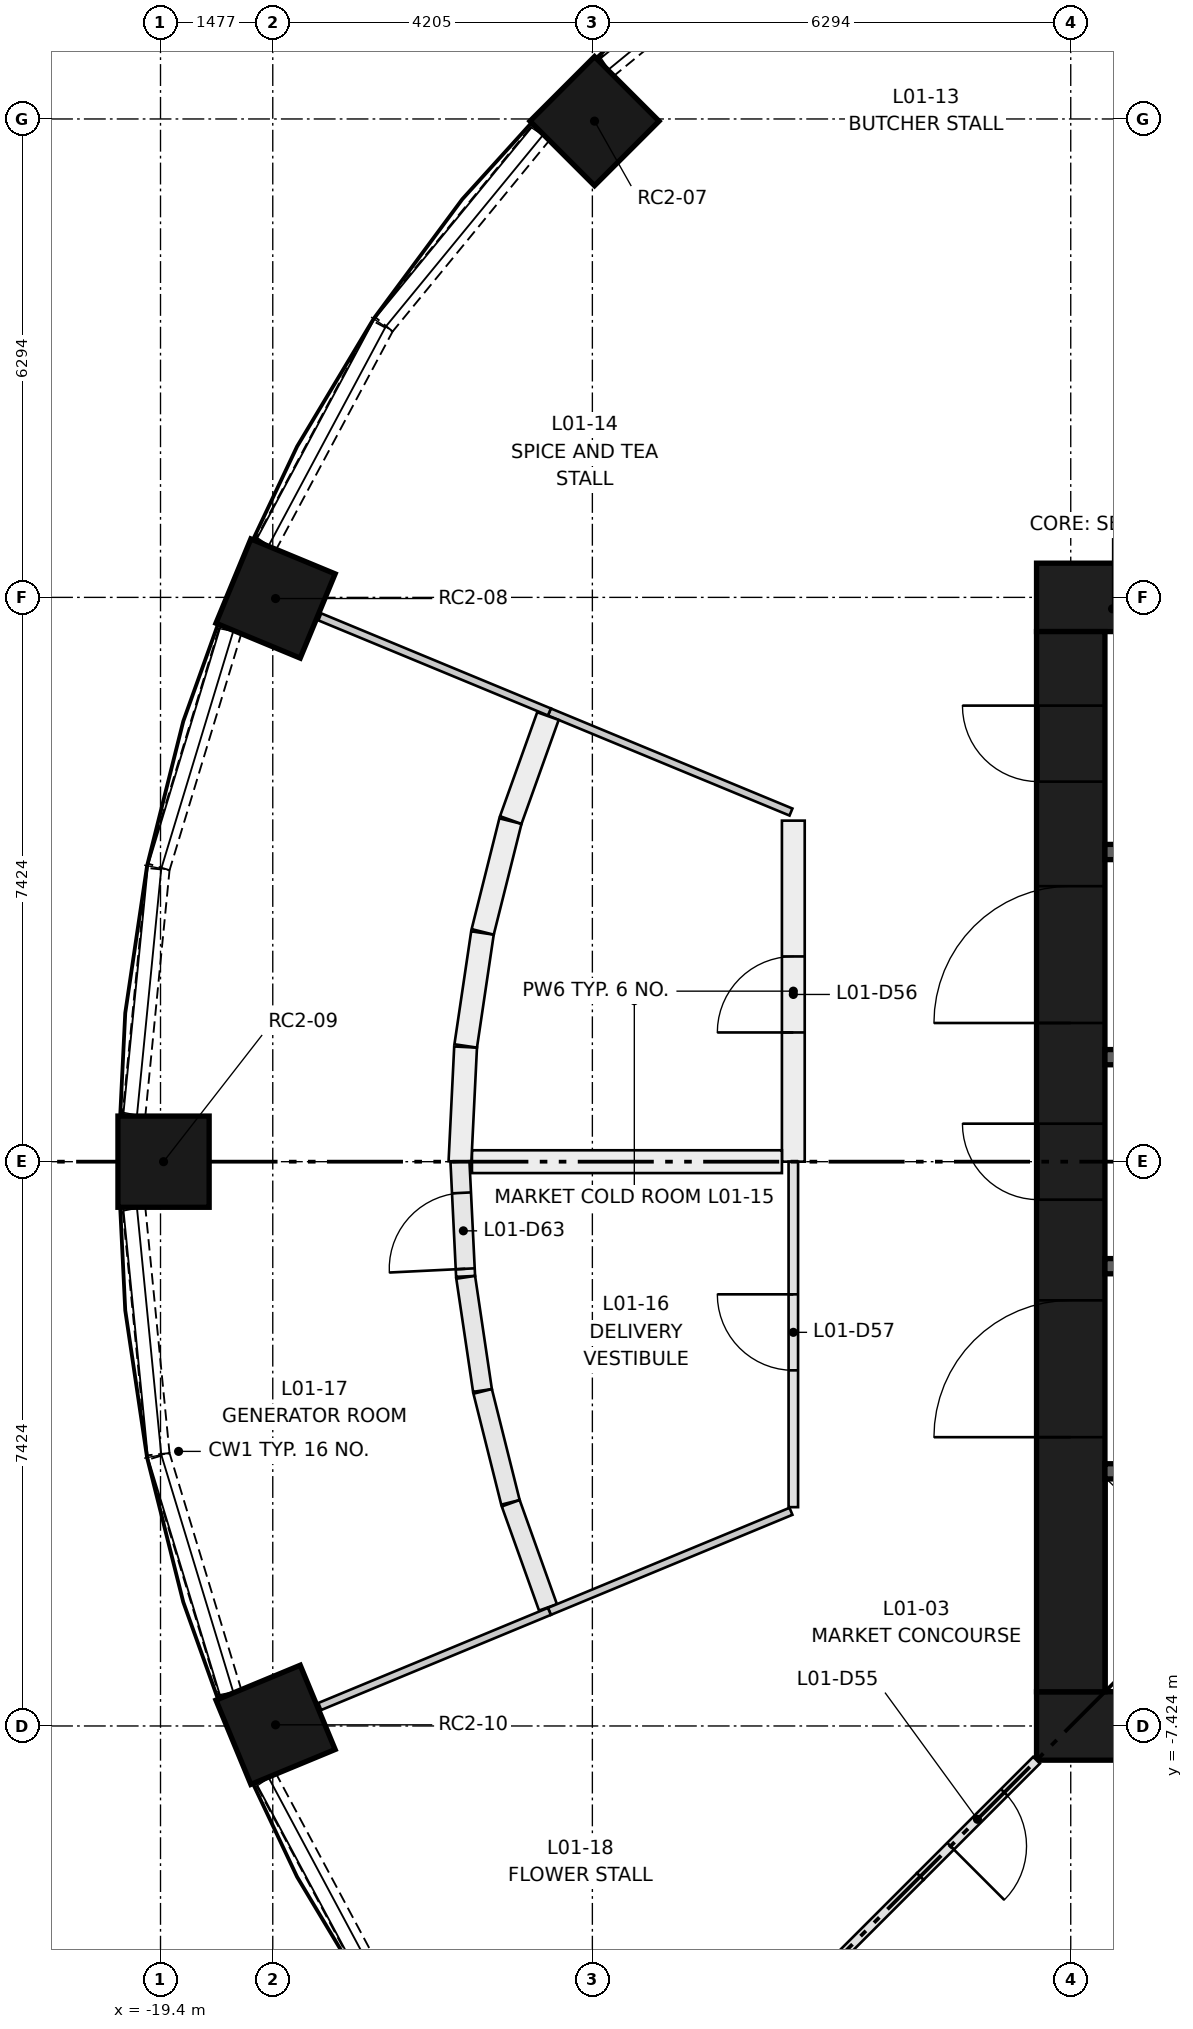
"""IFC4 building model, lengths in metres.
Left out: names, types, materials, properties, quantities, classifications, styles, units other than length and angle.
Written with IfcOpenShell. Run it as: python <this file> out.ifc"""

import sys

from ifc_helpers import new_model, si_unit, direction, frame, frame_2d, origin, origin_2d, place, context, subcontext, project, spatial, rectangle, extrude, element, fill, save


model = new_model("IFC4")
c1 = context("Model", 3, precision=1e-05, world=origin(), true_north=direction((0.0, 1.0)))
c2 = subcontext(c1, "Body", "Model", "MODEL_VIEW")
j1 = project(units=[si_unit("LENGTHUNIT", "METRE"), si_unit("PLANEANGLEUNIT", "RADIAN")], contexts=[c1])
p1 = place(None, origin())
s1 = spatial("IfcSite", under=j1, at=p1, CompositionType="ELEMENT")
p2 = place(p1, origin())
s2 = spatial("IfcBuilding", under=s1, at=p2, CompositionType="ELEMENT")
p3 = place(p2, frame((0.0, 0.0, 5.2)))
s3 = spatial("IfcBuildingStorey", under=s2, at=p3, CompositionType="ELEMENT", Elevation=5.2)
for number, where, z_axis, x_axis in (
    (1, (-13.69, 13.69, 0.0), (0.0, 0.0, 1.0), (-0.707, 0.707, 0.0)),
    (2, (-17.886, 7.409, 0.0), (0.0, 0.0, 1.0), (-0.924, 0.383, 0.0)),
    (3, (-19.36, 0.0, 0.0), (0.0, 0.0, 1.0), (-1.0, 0.0, 0.0)),
    (4, (-17.886, -7.409, 0.0), (0.0, 0.0, 1.0), (-0.924, -0.383, 0.0)),
):
    element("IfcColumn", number, at=place(p3, frame(where, z_axis=z_axis, x_axis=x_axis)), inside=s3, PredefinedType="COLUMN", context=c2, shape_type="SweptSolid", body=[
        extrude(rectangle(XDim=1.2, YDim=1.2, at=origin_2d()), origin(), (0.0, 0.0, 1.0), 4.7),
    ])
for number, where, z_axis, x_axis in (
    (5, (-7.874, -7.424, 0.0), (0.0, 0.0, 1.0), (1.0, 0.0, 0.0)),
    (6, (-7.874, 7.424, 0.0), (0.0, 0.0, 1.0), (1.0, 0.0, 0.0)),
):
    element("IfcWall", number, at=place(p3, frame(where, z_axis=z_axis, x_axis=x_axis)), inside=s3, PredefinedType="SHEAR", context=c2, shape_type="SweptSolid", body=[
        extrude(rectangle(XDim=15.748, YDim=0.9, at=frame_2d((7.874, 0.0))), origin(), (0.0, 0.0, 1.0), 4.7),
    ])
p4 = place(p3, frame((-7.424, -6.974, 0.0), z_axis=(0.0, 0.0, 1.0), x_axis=(0.0, 1.0, 0.0)))
e7 = element("IfcWall", 7, at=p4, inside=s3, PredefinedType="SHEAR", context=c2, shape_type="SweptSolid", body=[
    extrude(rectangle(XDim=13.948, YDim=0.9, at=frame_2d((6.974, 0.0))), origin(), (0.0, 0.0, 1.0), 4.7),
])
p5 = place(p4, frame((6.474, 0.0, 0.0)))
e8 = element("IfcOpeningElement", 8, at=p5, cuts=e7, PredefinedType="OPENING", context=c2, shape_type="SweptSolid", body=[
    extrude(rectangle(XDim=1.0, YDim=2.1, at=frame_2d((0.5, 1.05))), frame((0.0, 0.46, 0.0), z_axis=(0.0, -1.0, 0.0), x_axis=(1.0, 0.0, 0.0)), (0.0, 0.0, 1.0), 0.92),
])
p6 = place(p4, frame((3.35, 0.0, 0.0)))
e9 = element("IfcOpeningElement", 9, at=p6, cuts=e7, PredefinedType="OPENING", context=c2, shape_type="SweptSolid", body=[
    extrude(rectangle(XDim=1.8, YDim=2.1, at=frame_2d((0.9, 1.05))), frame((0.0, 0.46, 0.0), z_axis=(0.0, -1.0, 0.0), x_axis=(1.0, 0.0, 0.0)), (0.0, 0.0, 1.0), 0.92),
])
p7 = place(p4, frame((8.799, 0.0, 0.0)))
e10 = element("IfcOpeningElement", 10, at=p7, cuts=e7, PredefinedType="OPENING", context=c2, shape_type="SweptSolid", body=[
    extrude(rectangle(XDim=1.8, YDim=2.1, at=frame_2d((0.9, 1.05))), frame((0.0, 0.46, 0.0), z_axis=(0.0, -1.0, 0.0), x_axis=(1.0, 0.0, 0.0)), (0.0, 0.0, 1.0), 0.92),
])
p8 = place(p4, frame((11.974, 0.0, 0.0)))
e11 = element("IfcOpeningElement", 11, at=p8, cuts=e7, PredefinedType="OPENING", context=c2, shape_type="SweptSolid", body=[
    extrude(rectangle(XDim=1.0, YDim=2.1, at=frame_2d((0.5, 1.05))), frame((0.0, 0.46, 0.0), z_axis=(0.0, -1.0, 0.0), x_axis=(1.0, 0.0, 0.0)), (0.0, 0.0, 1.0), 0.92),
])
p9 = place(p3, frame((-6.974, -4.074, 0.0), z_axis=(0.0, 0.0, 1.0), x_axis=(1.0, 0.0, 0.0)))
e12 = element("IfcWall", 12, at=p9, inside=s3, PredefinedType="SHEAR", context=c2, shape_type="SweptSolid", body=[
    extrude(rectangle(XDim=13.948, YDim=0.2, at=frame_2d((6.974, 0.0))), origin(), (0.0, 0.0, 1.0), 4.3),
])
p10 = place(p9, frame((0.918, 0.0, 0.0)))
e13 = element("IfcOpeningElement", 13, at=p10, cuts=e12, PredefinedType="OPENING", context=c2, shape_type="SweptSolid", body=[
    extrude(rectangle(XDim=1.1, YDim=2.1, at=frame_2d((0.55, 1.05))), frame((0.0, 0.11, 0.0), z_axis=(0.0, -1.0, 0.0), x_axis=(1.0, 0.0, 0.0)), (0.0, 0.0, 1.0), 0.22),
])
p11 = place(p9, frame((4.055, 0.0, 0.0)))
e14 = element("IfcOpeningElement", 14, at=p11, cuts=e12, PredefinedType="OPENING", context=c2, shape_type="SweptSolid", body=[
    extrude(rectangle(XDim=1.1, YDim=2.1, at=frame_2d((0.55, 1.05))), frame((0.0, 0.11, 0.0), z_axis=(0.0, -1.0, 0.0), x_axis=(1.0, 0.0, 0.0)), (0.0, 0.0, 1.0), 0.22),
])
p12 = place(p9, frame((6.658, 0.0, 0.0)))
e15 = element("IfcOpeningElement", 15, at=p12, cuts=e12, PredefinedType="OPENING", context=c2, shape_type="SweptSolid", body=[
    extrude(rectangle(XDim=1.0, YDim=2.1, at=frame_2d((0.5, 1.05))), frame((0.0, 0.11, 0.0), z_axis=(0.0, -1.0, 0.0), x_axis=(1.0, 0.0, 0.0)), (0.0, 0.0, 1.0), 0.22),
])
p13 = place(p9, frame((8.627, 0.0, 0.0)))
e16 = element("IfcOpeningElement", 16, at=p13, cuts=e12, PredefinedType="OPENING", context=c2, shape_type="SweptSolid", body=[
    extrude(rectangle(XDim=1.0, YDim=2.1, at=frame_2d((0.5, 1.05))), frame((0.0, 0.11, 0.0), z_axis=(0.0, -1.0, 0.0), x_axis=(1.0, 0.0, 0.0)), (0.0, 0.0, 1.0), 0.22),
])
p14 = place(p9, frame((10.595, 0.0, 0.0)))
e17 = element("IfcOpeningElement", 17, at=p14, cuts=e12, PredefinedType="OPENING", context=c2, shape_type="SweptSolid", body=[
    extrude(rectangle(XDim=1.0, YDim=2.1, at=frame_2d((0.5, 1.05))), frame((0.0, 0.11, 0.0), z_axis=(0.0, -1.0, 0.0), x_axis=(1.0, 0.0, 0.0)), (0.0, 0.0, 1.0), 0.22),
])
p15 = place(p9, frame((12.564, 0.0, 0.0)))
e18 = element("IfcOpeningElement", 18, at=p15, cuts=e12, PredefinedType="OPENING", context=c2, shape_type="SweptSolid", body=[
    extrude(rectangle(XDim=1.0, YDim=2.1, at=frame_2d((0.5, 1.05))), frame((0.0, 0.11, 0.0), z_axis=(0.0, -1.0, 0.0), x_axis=(1.0, 0.0, 0.0)), (0.0, 0.0, 1.0), 0.22),
])
p16 = place(p3, frame((-6.974, 4.074, 0.0), z_axis=(0.0, 0.0, 1.0), x_axis=(1.0, 0.0, 0.0)))
e19 = element("IfcWall", 19, at=p16, inside=s3, PredefinedType="SHEAR", context=c2, shape_type="SweptSolid", body=[
    extrude(rectangle(XDim=6.974, YDim=0.2, at=frame_2d((3.487, 0.0))), origin(), (0.0, 0.0, 1.0), 4.3),
])
for number, where, z_axis, x_axis in (
    (20, (-6.974, -1.375, 0.0), (0.0, 0.0, 1.0), (1.0, 0.0, 0.0)),
    (21, (-6.974, 1.375, 0.0), (0.0, 0.0, 1.0), (1.0, 0.0, 0.0)),
):
    element("IfcWall", number, at=place(p3, frame(where, z_axis=z_axis, x_axis=x_axis)), inside=s3, PredefinedType="SHEAR", context=c2, shape_type="SweptSolid", body=[
        extrude(rectangle(XDim=2.6, YDim=0.2, at=frame_2d((1.3, 0.0))), origin(), (0.0, 0.0, 1.0), 4.3),
    ])
for number, where, z_axis, x_axis in (
    (22, (-11.018, 16.461, 0.0), (0.0, 0.0, 1.0), (-0.773, -0.634, 0.0)),
    (23, (-14.399, 13.531, 0.0), (0.0, 0.0, 1.0), (-0.634, -0.773, 0.0)),
):
    element("IfcWall", number, at=place(p3, frame(where, z_axis=z_axis, x_axis=x_axis)), inside=s3, PredefinedType="SOLIDWALL", context=c2, shape_type="SweptSolid", body=[
        extrude(rectangle(XDim=3.251, YDim=0.3, at=frame_2d((1.626, 0.0))), origin(), (0.0, 0.0, 1.0), 0.45),
    ])
p17 = place(p3, frame((-16.478, 10.993, 0.0), z_axis=(0.0, 0.0, 1.0), x_axis=(-0.471308820961, -0.881968250723, 0.0)))
e24 = element("IfcWall", 24, at=p17, inside=s3, PredefinedType="SOLIDWALL", context=c2, shape_type="SweptSolid", body=[
    extrude(rectangle(XDim=3.252, YDim=0.3, at=frame_2d((1.626, 0.0))), origin(), (0.0, 0.0, 1.0), 0.45),
])
p18 = place(p3, frame((-18.48, 6.99, 0.0), z_axis=(0.0, 0.0, 1.0), x_axis=(-0.290301164038, -0.956935334366, 0.0)))
e25 = element("IfcWall", 25, at=p18, inside=s3, PredefinedType="SOLIDWALL", context=c2, shape_type="SweptSolid", body=[
    extrude(rectangle(XDim=3.252, YDim=0.3, at=frame_2d((1.626, 0.0))), origin(), (0.0, 0.0, 1.0), 0.45),
])
for number, where, z_axis, x_axis in (
    (26, (-19.43, 3.849, 0.0), (0.0, 0.0, 1.0), (-0.098, -0.995, 0.0)),
    (27, (-19.75, -0.613, 0.0), (0.0, 0.0, 1.0), (0.098, -0.995, 0.0)),
):
    element("IfcWall", number, at=place(p3, frame(where, z_axis=z_axis, x_axis=x_axis)), inside=s3, PredefinedType="SOLIDWALL", context=c2, shape_type="SweptSolid", body=[
        extrude(rectangle(XDim=3.252, YDim=0.3, at=frame_2d((1.626, 0.0))), origin(), (0.0, 0.0, 1.0), 0.45),
    ])
p19 = place(p3, frame((-19.425, -3.878, 0.0), z_axis=(0.0, 0.0, 1.0), x_axis=(0.290301164038, -0.956935334366, 0.0)))
e28 = element("IfcWall", 28, at=p19, inside=s3, PredefinedType="SOLIDWALL", context=c2, shape_type="SweptSolid", body=[
    extrude(rectangle(XDim=3.252, YDim=0.3, at=frame_2d((1.626, 0.0))), origin(), (0.0, 0.0, 1.0), 0.45),
])
p20 = place(p3, frame((-18.011, -8.124, 0.0), z_axis=(0.0, 0.0, 1.0), x_axis=(0.471308820961, -0.881968250723, 0.0)))
e29 = element("IfcWall", 29, at=p20, inside=s3, PredefinedType="SOLIDWALL", context=c2, shape_type="SweptSolid", body=[
    extrude(rectangle(XDim=3.252, YDim=0.3, at=frame_2d((1.626, 0.0))), origin(), (0.0, 0.0, 1.0), 0.45),
])
p21 = place(p3, frame((-7.874, -7.874, 0.0), z_axis=(0.0, 0.0, 1.0), x_axis=(-0.707106781187, -0.707106781187, 0.0)))
e30 = element("IfcWall", 30, at=p21, inside=s3, PredefinedType="PARTITIONING", context=c2, shape_type="SweptSolid", body=[
    extrude(rectangle(XDim=2.165, YDim=0.125, at=frame_2d((1.082, 0.0))), origin(), (0.0, 0.0, 1.0), 4.3),
])
p22 = place(p21, frame((0.6, 0.0, 0.0)))
e31 = element("IfcOpeningElement", 31, at=p22, cuts=e30, PredefinedType="OPENING", context=c2, shape_type="SweptSolid", body=[
    extrude(rectangle(XDim=1.0, YDim=2.1, at=frame_2d((0.5, 1.05))), frame((0.0, 0.073, 0.0), z_axis=(0.0, -1.0, 0.0), x_axis=(1.0, 0.0, 0.0)), (0.0, 0.0, 1.0), 0.145),
])
p23 = place(p3, frame((-11.074, 0.0, 0.0), z_axis=(0.0, 0.0, 1.0), x_axis=(0.0, 1.0, 0.0)))
e32 = element("IfcWall", 32, at=p23, inside=s3, PredefinedType="PARTITIONING", context=c2, shape_type="SweptSolid", body=[
    extrude(rectangle(XDim=4.487, YDim=0.3, at=frame_2d((2.243, 0.0))), origin(), (0.0, 0.0, 1.0), 4.3),
])
p24 = place(p23, frame((1.7, 0.0, 0.0)))
e33 = element("IfcOpeningElement", 33, at=p24, cuts=e32, PredefinedType="OPENING", context=c2, shape_type="SweptSolid", body=[
    extrude(rectangle(XDim=1.0, YDim=2.1, at=frame_2d((0.5, 1.05))), frame((0.0, 0.16, 0.0), z_axis=(0.0, -1.0, 0.0), x_axis=(1.0, 0.0, 0.0)), (0.0, 0.0, 1.0), 0.32),
])
p25 = place(p3, frame((-11.074, -4.545, 0.0), z_axis=(0.0, 0.0, 1.0), x_axis=(0.0, 1.0, 0.0)))
e34 = element("IfcWall", 34, at=p25, inside=s3, PredefinedType="PARTITIONING", context=c2, shape_type="SweptSolid", body=[
    extrude(rectangle(XDim=4.545, YDim=0.125, at=frame_2d((2.272, 0.0))), origin(), (0.0, 0.0, 1.0), 4.3),
])
p26 = place(p25, frame((1.8, 0.0, 0.0)))
e35 = element("IfcOpeningElement", 35, at=p26, cuts=e34, PredefinedType="OPENING", context=c2, shape_type="SweptSolid", body=[
    extrude(rectangle(XDim=1.0, YDim=2.1, at=frame_2d((0.5, 1.05))), frame((0.0, 0.073, 0.0), z_axis=(0.0, -1.0, 0.0), x_axis=(1.0, 0.0, 0.0)), (0.0, 0.0, 1.0), 0.145),
])
p27 = place(p3, frame((-5.916, 14.283, 0.0), z_axis=(0.0, 0.0, 1.0), x_axis=(-0.382716658507, 0.923865769093, 0.0)))
e36 = element("IfcWall", 36, at=p27, inside=s3, PredefinedType="PARTITIONING", context=c2, shape_type="SweptSolid", body=[
    extrude(rectangle(XDim=3.27, YDim=0.1, at=frame_2d((1.635, 0.0))), origin(), (0.0, 0.0, 1.0), 4.3),
])
p28 = place(p3, frame((-11.105, 4.6, 0.0), z_axis=(0.0, 0.0, 1.0), x_axis=(-0.92388535755, 0.382669369174, 0.0)))
e37 = element("IfcWall", 37, at=p28, inside=s3, PredefinedType="PARTITIONING", context=c2, shape_type="SweptSolid", body=[
    extrude(rectangle(XDim=3.44, YDim=0.1, at=frame_2d((1.72, 0.0))), origin(), (0.0, 0.0, 1.0), 4.3),
])
p29 = place(p3, frame((-14.283, 5.916, 0.0), z_axis=(0.0, 0.0, 1.0), x_axis=(-0.923865769093, 0.382716658507, 0.0)))
e38 = element("IfcWall", 38, at=p29, inside=s3, PredefinedType="PARTITIONING", context=c2, shape_type="SweptSolid", body=[
    extrude(rectangle(XDim=3.27, YDim=0.1, at=frame_2d((1.635, 0.0))), origin(), (0.0, 0.0, 1.0), 4.3),
])
p30 = place(p3, frame((-11.224, 0.0, 0.0), z_axis=(0.0, 0.0, 1.0), x_axis=(-1.0, 0.0, 0.0)))
e39 = element("IfcWall", 39, at=p30, inside=s3, PredefinedType="PARTITIONING", context=c2, shape_type="SweptSolid", body=[
    extrude(rectangle(XDim=4.078, YDim=0.3, at=frame_2d((2.039, 0.0))), origin(), (0.0, 0.0, 1.0), 4.3),
])
p31 = place(p3, frame((-15.46, 0.0, 0.0), z_axis=(0.0, 0.0, 1.0), x_axis=(0.049001943169, 0.998798683202, 0.0)))
e40 = element("IfcWall", 40, at=p31, inside=s3, PredefinedType="PARTITIONING", context=c2, shape_type="SweptSolid", body=[
    extrude(rectangle(XDim=1.51, YDim=0.3, at=frame_2d((0.755, 0.0))), origin(), (0.0, 0.0, 1.0), 4.3),
])
for number, where, z_axis, x_axis in (
    (41, (-15.385, 1.523, 0.0), (0.0, 0.0, 1.0), (0.147, 0.989, 0.0)),
    (42, (-15.161, 3.023, 0.0), (0.0, 0.0, 1.0), (0.243, 0.97, 0.0)),
):
    element("IfcWall", number, at=place(p3, frame(where, z_axis=z_axis, x_axis=x_axis)), inside=s3, PredefinedType="PARTITIONING", context=c2, shape_type="SweptSolid", body=[
        extrude(rectangle(XDim=1.502, YDim=0.3, at=frame_2d((0.751, 0.0))), origin(), (0.0, 0.0, 1.0), 4.3),
    ])
p32 = place(p3, frame((-14.792, 4.495, 0.0), z_axis=(0.0, 0.0, 1.0), x_axis=(0.336826132197, 0.941566862559, 0.0)))
e43 = element("IfcWall", 43, at=p32, inside=s3, PredefinedType="PARTITIONING", context=c2, shape_type="SweptSolid", body=[
    extrude(rectangle(XDim=1.453, YDim=0.3, at=frame_2d((0.726, 0.0))), origin(), (0.0, 0.0, 1.0), 4.3),
])
p33 = place(p3, frame((-15.386, -1.509, 0.0), z_axis=(0.0, 0.0, 1.0), x_axis=(-0.048954497891, 0.998801009779, 0.0)))
e44 = element("IfcWall", 44, at=p33, inside=s3, PredefinedType="PARTITIONING", context=c2, shape_type="SweptSolid", body=[
    extrude(rectangle(XDim=1.511, YDim=0.25, at=frame_2d((0.755, 0.0))), origin(), (0.0, 0.0, 1.0), 4.3),
])
p34 = place(p33, frame((0.1, 0.0, 0.0)))
e45 = element("IfcOpeningElement", 45, at=p34, cuts=e44, PredefinedType="OPENING", context=c2, shape_type="SweptSolid", body=[
    extrude(rectangle(XDim=1.0, YDim=2.1, at=frame_2d((0.5, 1.05))), frame((0.0, 0.135, 0.0), z_axis=(0.0, -1.0, 0.0), x_axis=(1.0, 0.0, 0.0)), (0.0, 0.0, 1.0), 0.27),
])
p35 = place(p3, frame((-15.164, -3.01, 0.0), z_axis=(0.0, 0.0, 1.0), x_axis=(-0.146825003666, 0.989162483265, 0.0)))
e46 = element("IfcWall", 46, at=p35, inside=s3, PredefinedType="PARTITIONING", context=c2, shape_type="SweptSolid", body=[
    extrude(rectangle(XDim=1.505, YDim=0.25, at=frame_2d((0.752, 0.0))), origin(), (0.0, 0.0, 1.0), 4.3),
])
p36 = place(p3, frame((-14.796, -4.482, 0.0), z_axis=(0.0, 0.0, 1.0), x_axis=(-0.242917416803, 0.970046972375, 0.0)))
e47 = element("IfcWall", 47, at=p36, inside=s3, PredefinedType="PARTITIONING", context=c2, shape_type="SweptSolid", body=[
    extrude(rectangle(XDim=1.505, YDim=0.25, at=frame_2d((0.752, 0.0))), origin(), (0.0, 0.0, 1.0), 4.3),
])
p37 = place(p3, frame((-14.302, -5.863, 0.0), z_axis=(0.0, 0.0, 1.0), x_axis=(-0.336995469999, 0.941506268274, 0.0)))
e48 = element("IfcWall", 48, at=p37, inside=s3, PredefinedType="PARTITIONING", context=c2, shape_type="SweptSolid", body=[
    extrude(rectangle(XDim=1.455, YDim=0.25, at=frame_2d((0.728, 0.0))), origin(), (0.0, 0.0, 1.0), 4.3),
])
p38 = place(p3, frame((-11.105, -4.6, 0.0), z_axis=(0.0, 0.0, 1.0), x_axis=(-0.92388535755, -0.382669369174, 0.0)))
e49 = element("IfcWall", 49, at=p38, inside=s3, PredefinedType="PARTITIONING", context=c2, shape_type="SweptSolid", body=[
    extrude(rectangle(XDim=3.44, YDim=0.1, at=frame_2d((1.72, 0.0))), origin(), (0.0, 0.0, 1.0), 4.3),
])
p39 = place(p3, frame((-14.283, -5.916, 0.0), z_axis=(0.0, 0.0, 1.0), x_axis=(-0.923865769093, -0.382716658507, 0.0)))
e50 = element("IfcWall", 50, at=p39, inside=s3, PredefinedType="PARTITIONING", context=c2, shape_type="SweptSolid", body=[
    extrude(rectangle(XDim=3.27, YDim=0.1, at=frame_2d((1.635, 0.0))), origin(), (0.0, 0.0, 1.0), 4.3),
])
p40 = place(p3, frame((-9.405, -9.405, 0.0), z_axis=(0.0, 0.0, 1.0), x_axis=(-0.707106781187, -0.707106781187, 0.0)))
e51 = element("IfcWall", 51, at=p40, inside=s3, PredefinedType="PARTITIONING", context=c2, shape_type="SweptSolid", body=[
    extrude(rectangle(XDim=5.43, YDim=0.125, at=frame_2d((2.715, 0.0))), origin(), (0.0, 0.0, 1.0), 4.3),
])
p41 = place(p5, origin())
e52 = element("IfcDoor", 52, at=p41, inside=s3, OperationType="SINGLE_SWING_RIGHT", PredefinedType="DOOR", context=c2, shape_type="SweptSolid", body=[
    extrude(rectangle(XDim=1.0, YDim=2.1, at=frame_2d((0.5, 1.05))), frame((0.0, 0.45, 0.0), z_axis=(0.0, -1.0, 0.0), x_axis=(1.0, 0.0, 0.0)), (0.0, 0.0, 1.0), 0.05),
])
fill(e8, e52)
p42 = place(p6, origin())
e53 = element("IfcDoor", 53, at=p42, inside=s3, OperationType="DOUBLE_DOOR_SINGLE_SWING", PredefinedType="DOOR", context=c2, shape_type="SweptSolid", body=[
    extrude(rectangle(XDim=1.8, YDim=2.1, at=frame_2d((0.9, 1.05))), frame((0.0, 0.025, 0.0), z_axis=(0.0, -1.0, 0.0), x_axis=(1.0, 0.0, 0.0)), (0.0, 0.0, 1.0), 0.05),
])
fill(e9, e53)
p43 = place(p7, origin())
e54 = element("IfcDoor", 54, at=p43, inside=s3, OperationType="DOUBLE_DOOR_SINGLE_SWING", PredefinedType="DOOR", context=c2, shape_type="SweptSolid", body=[
    extrude(rectangle(XDim=1.8, YDim=2.1, at=frame_2d((0.9, 1.05))), frame((0.0, 0.025, 0.0), z_axis=(0.0, -1.0, 0.0), x_axis=(1.0, 0.0, 0.0)), (0.0, 0.0, 1.0), 0.05),
])
fill(e10, e54)
p44 = place(p8, origin())
e55 = element("IfcDoor", 55, at=p44, inside=s3, OperationType="SINGLE_SWING_RIGHT", PredefinedType="DOOR", context=c2, shape_type="SweptSolid", body=[
    extrude(rectangle(XDim=1.0, YDim=2.1, at=frame_2d((0.5, 1.05))), frame((0.0, 0.45, 0.0), z_axis=(0.0, -1.0, 0.0), x_axis=(1.0, 0.0, 0.0)), (0.0, 0.0, 1.0), 0.05),
])
fill(e11, e55)
p45 = place(p22, origin())
e56 = element("IfcDoor", 56, at=p45, inside=s3, OperationType="SINGLE_SWING_RIGHT", PredefinedType="DOOR", context=c2, shape_type="SweptSolid", body=[
    extrude(rectangle(XDim=1.0, YDim=2.1, at=frame_2d((0.5, 1.05))), frame((0.0, 0.025, 0.0), z_axis=(0.0, -1.0, 0.0), x_axis=(1.0, 0.0, 0.0)), (0.0, 0.0, 1.0), 0.05),
])
fill(e31, e56)
p46 = place(p24, origin())
e57 = element("IfcDoor", 57, at=p46, inside=s3, OperationType="SINGLE_SWING_LEFT", PredefinedType="DOOR", context=c2, shape_type="SweptSolid", body=[
    extrude(rectangle(XDim=1.0, YDim=2.1, at=frame_2d((0.5, 1.05))), frame((0.0, 0.025, 0.0), z_axis=(0.0, -1.0, 0.0), x_axis=(1.0, 0.0, 0.0)), (0.0, 0.0, 1.0), 0.05),
])
fill(e33, e57)
p47 = place(p26, origin())
e58 = element("IfcDoor", 58, at=p47, inside=s3, OperationType="SINGLE_SWING_RIGHT", PredefinedType="DOOR", context=c2, shape_type="SweptSolid", body=[
    extrude(rectangle(XDim=1.0, YDim=2.1, at=frame_2d((0.5, 1.05))), frame((0.0, 0.025, 0.0), z_axis=(0.0, -1.0, 0.0), x_axis=(1.0, 0.0, 0.0)), (0.0, 0.0, 1.0), 0.05),
])
fill(e35, e58)
p48 = place(p34, origin())
e59 = element("IfcDoor", 59, at=p48, inside=s3, OperationType="SINGLE_SWING_LEFT", PredefinedType="DOOR", context=c2, shape_type="SweptSolid", body=[
    extrude(rectangle(XDim=1.0, YDim=2.1, at=frame_2d((0.5, 1.05))), frame((0.0, 0.025, 0.0), z_axis=(0.0, -1.0, 0.0), x_axis=(1.0, 0.0, 0.0)), (0.0, 0.0, 1.0), 0.05),
])
fill(e45, e59)
save(model, sys.argv[1])
